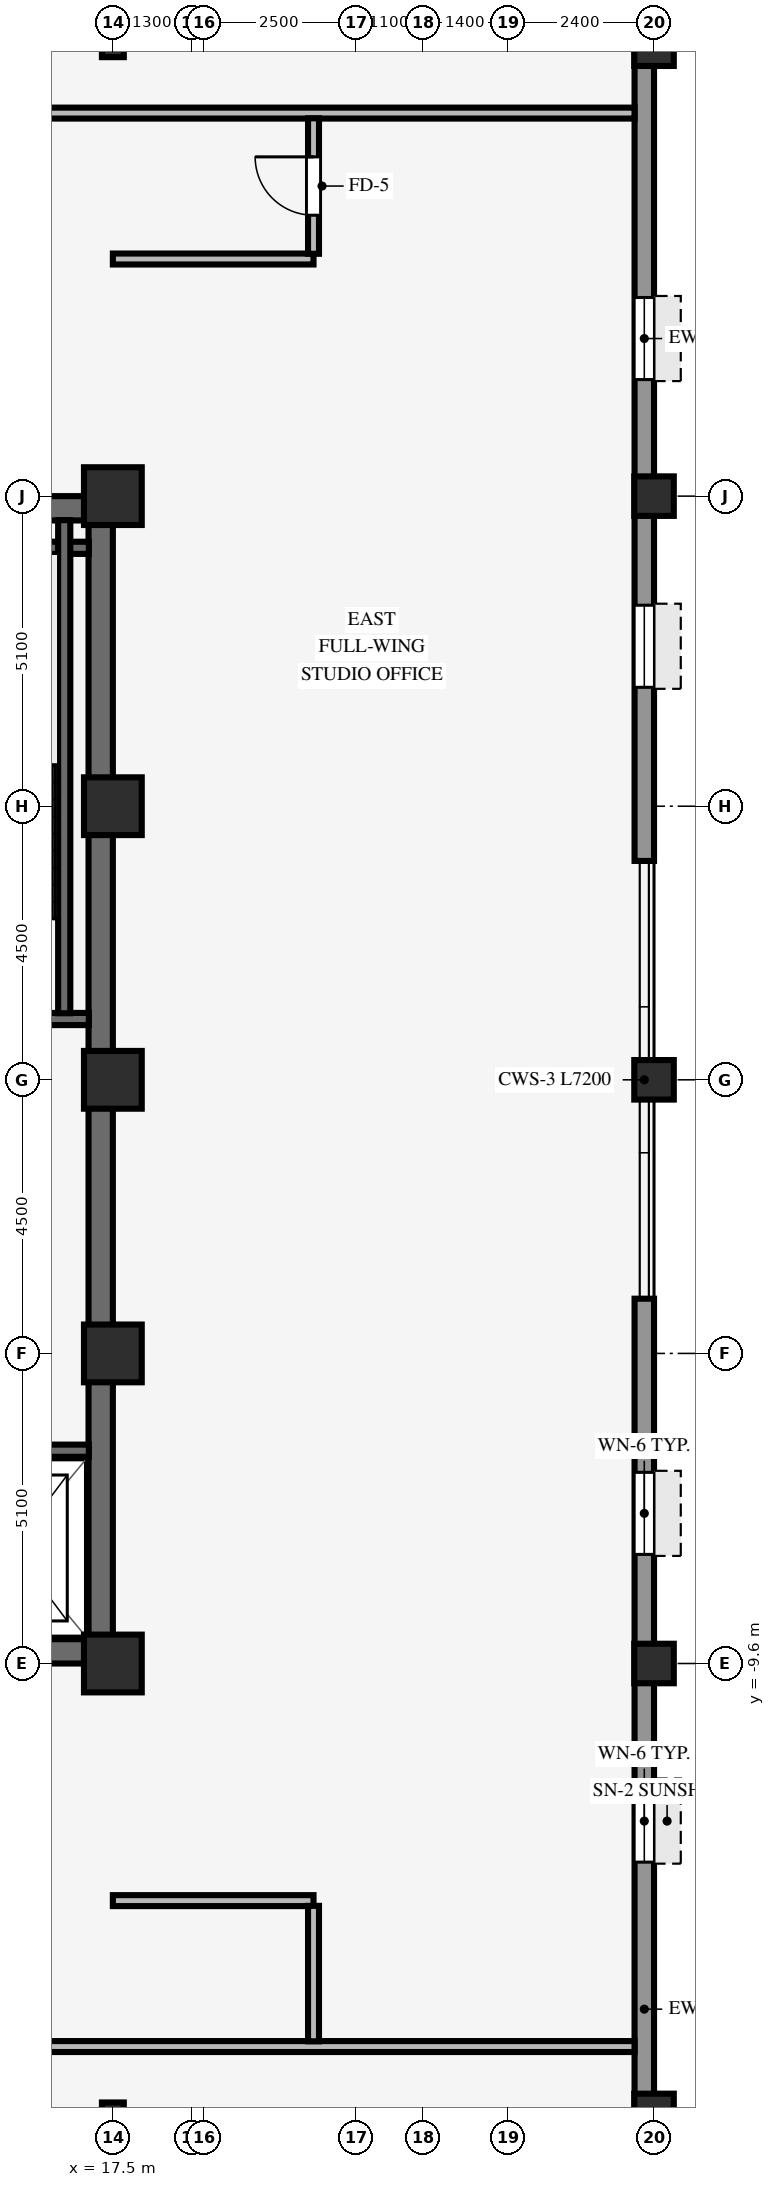
"""IFC4 building model, lengths in metres.
Left out: names, types, materials, properties, quantities, classifications, styles, units other than length and angle.
Written with IfcOpenShell. Run it as: python <this file> out.ifc"""

import sys

from ifc_helpers import new_model, si_unit, direction, frame, frame_2d, origin, origin_2d, place, context, subcontext, project, spatial, rectangle, hollow_rectangle, i_section, extrude, source, transform, mapped, element, fill, save


model = new_model("IFC4")
c1 = context("Model", 3, precision=1e-05, world=origin(), true_north=direction((0.0, 1.0)))
c2 = subcontext(c1, "Body", "Model", "MODEL_VIEW")
j1 = project(units=[si_unit("LENGTHUNIT", "METRE"), si_unit("PLANEANGLEUNIT", "RADIAN")], contexts=[c1])
p1 = place(None, origin())
s1 = spatial("IfcSite", under=j1, at=p1, CompositionType="ELEMENT")
p2 = place(p1, origin())
s2 = spatial("IfcBuilding", under=s1, at=p2, CompositionType="ELEMENT")
p3 = place(p2, frame((0.0, 0.0, 123.85)))
s3 = spatial("IfcBuildingStorey", under=s2, at=p3, CompositionType="ELEMENT", Elevation=123.85)
for number, where, z_axis, x_axis in (
    (1, (9.0, -9.4, 0.0), (0.0, 0.0, 1.0), (1.0, 0.0, 0.0)),
    (2, (9.0, 9.4, 0.0), (0.0, 0.0, 1.0), (1.0, 0.0, 0.0)),
):
    element("IfcWall", number, at=place(p3, frame(where, z_axis=z_axis, x_axis=x_axis)), inside=s3, PredefinedType="SHEAR", context=c2, shape_type="SweptSolid", body=[
        extrude(rectangle(XDim=8.5, YDim=0.4, at=frame_2d((4.25, 0.0))), origin(), (0.0, 0.0, 1.0), 3.37),
    ])
p4 = place(p3, frame((17.3, -9.205, 0.0), z_axis=(0.0, 0.0, 1.0), x_axis=(0.0, 1.0, 0.0)))
e3 = element("IfcWall", 3, at=p4, inside=s3, PredefinedType="SHEAR", context=c2, shape_type="SweptSolid", body=[
    extrude(rectangle(XDim=18.41, YDim=0.4, at=frame_2d((9.205, 0.0))), origin(), (0.0, 0.0, 1.0), 3.37),
])
for number, where, z_axis, x_axis in (
    (4, (17.5, -9.6, 0.0), (0.0, 0.0, 1.0), (1.0, 0.0, 0.0)),
    (5, (17.5, -4.5, 0.0), (0.0, 0.0, 1.0), (1.0, 0.0, 0.0)),
    (6, (17.5, 4.5, 0.0), (0.0, 0.0, 1.0), (1.0, 0.0, 0.0)),
    (7, (17.5, 9.6, 0.0), (0.0, 0.0, 1.0), (1.0, 0.0, 0.0)),
    (8, (17.5, 0.0, 0.0), (0.0, 0.0, 1.0), (1.0, 0.0, 0.0)),
):
    element("IfcColumn", number, at=place(p3, frame(where, z_axis=z_axis, x_axis=x_axis)), inside=s3, PredefinedType="COLUMN", context=c2, shape_type="SweptSolid", body=[
        extrude(rectangle(XDim=0.95, YDim=0.95, at=origin_2d()), origin(), (0.0, 0.0, 1.0), 3.37),
    ])
for number, where, z_axis, x_axis in (
    (9, (26.4, -17.0, 0.0), (0.0, 0.0, 1.0), (1.0, 0.0, 0.0)),
    (10, (26.4, -9.6, 0.0), (0.0, 0.0, 1.0), (1.0, 0.0, 0.0)),
    (11, (26.4, 0.0, 0.0), (0.0, 0.0, 1.0), (1.0, 0.0, 0.0)),
    (12, (26.4, 9.6, 0.0), (0.0, 0.0, 1.0), (1.0, 0.0, 0.0)),
    (13, (26.4, 17.0, 0.0), (0.0, 0.0, 1.0), (1.0, 0.0, 0.0)),
):
    element("IfcColumn", number, at=place(p3, frame(where, z_axis=z_axis, x_axis=x_axis)), inside=s3, PredefinedType="COLUMN", context=c2, shape_type="SweptSolid", body=[
        extrude(hollow_rectangle(XDim=0.65, YDim=0.65, WallThickness=0.04, InnerFilletRadius=0.04, OuterFilletRadius=0.08, at=origin_2d()), origin(), (0.0, 0.0, 1.0), 3.37),
    ])
for number, where, z_axis, x_axis in (
    (14, (17.5, -17.0, 0.0), (0.0, 0.0, 1.0), (1.0, 0.0, 0.0)),
    (15, (17.5, 17.0, 0.0), (0.0, 0.0, 1.0), (1.0, 0.0, 0.0)),
):
    element("IfcColumn", number, at=place(p3, frame(where, z_axis=z_axis, x_axis=x_axis)), inside=s3, PredefinedType="COLUMN", context=c2, shape_type="SweptSolid", body=[
        extrude(i_section(OverallWidth=0.36, OverallDepth=0.36, WebThickness=0.021, FlangeThickness=0.021, FilletRadius=0.018, at=origin_2d()), origin(), (0.0, 0.0, 1.0), 3.37),
    ])
p5 = place(p3, frame((26.24, -20.784, 0.0), z_axis=(0.0, 0.0, 1.0), x_axis=(0.0, 1.0, 0.0)))
e16 = element("IfcWall", 16, at=p5, inside=s3, PredefinedType="STANDARD", context=c2, shape_type="SweptSolid", body=[
    extrude(rectangle(XDim=17.184, YDim=0.32, at=frame_2d((8.592, 0.0))), origin(), (0.0, 0.0, 1.0), 2.705),
])
p6 = place(p5, frame((1.506, 0.0, 0.8)))
e17 = element("IfcOpeningElement", 17, at=p6, cuts=e16, PredefinedType="OPENING", context=c2, shape_type="SweptSolid", body=[
    extrude(rectangle(XDim=1.35, YDim=1.56, at=frame_2d((0.675, 0.78))), frame((0.0, 0.17, 0.0), z_axis=(0.0, -1.0, 0.0), x_axis=(1.0, 0.0, 0.0)), (0.0, 0.0, 1.0), 0.34),
])
p7 = place(p5, frame((7.917, 0.0, 0.8)))
e18 = element("IfcOpeningElement", 18, at=p7, cuts=e16, PredefinedType="OPENING", context=c2, shape_type="SweptSolid", body=[
    extrude(rectangle(XDim=1.35, YDim=1.56, at=frame_2d((0.675, 0.78))), frame((0.0, 0.17, 0.0), z_axis=(0.0, -1.0, 0.0), x_axis=(1.0, 0.0, 0.0)), (0.0, 0.0, 1.0), 0.34),
])
p8 = place(p5, frame((12.978, 0.0, 0.8)))
e19 = element("IfcOpeningElement", 19, at=p8, cuts=e16, PredefinedType="OPENING", context=c2, shape_type="SweptSolid", body=[
    extrude(rectangle(XDim=1.35, YDim=1.56, at=frame_2d((0.675, 0.78))), frame((0.0, 0.17, 0.0), z_axis=(0.0, -1.0, 0.0), x_axis=(1.0, 0.0, 0.0)), (0.0, 0.0, 1.0), 0.34),
])
p9 = place(p3, frame((26.24, 3.6, 0.0), z_axis=(0.0, 0.0, 1.0), x_axis=(0.0, 1.0, 0.0)))
e20 = element("IfcWall", 20, at=p9, inside=s3, PredefinedType="STANDARD", context=c2, shape_type="SweptSolid", body=[
    extrude(rectangle(XDim=17.184, YDim=0.32, at=frame_2d((8.592, 0.0))), origin(), (0.0, 0.0, 1.0), 2.705),
])
p10 = place(p9, frame((2.856, 0.0, 0.8)))
e21 = element("IfcOpeningElement", 21, at=p10, cuts=e20, PredefinedType="OPENING", context=c2, shape_type="SweptSolid", body=[
    extrude(rectangle(XDim=1.35, YDim=1.56, at=frame_2d((0.675, 0.78))), frame((0.0, 0.17, 0.0), z_axis=(0.0, -1.0, 0.0), x_axis=(1.0, 0.0, 0.0)), (0.0, 0.0, 1.0), 0.34),
])
p11 = place(p9, frame((7.917, 0.0, 0.8)))
e22 = element("IfcOpeningElement", 22, at=p11, cuts=e20, PredefinedType="OPENING", context=c2, shape_type="SweptSolid", body=[
    extrude(rectangle(XDim=1.35, YDim=1.56, at=frame_2d((0.675, 0.78))), frame((0.0, 0.17, 0.0), z_axis=(0.0, -1.0, 0.0), x_axis=(1.0, 0.0, 0.0)), (0.0, 0.0, 1.0), 0.34),
])
p12 = place(p9, frame((14.328, 0.0, 0.8)))
e23 = element("IfcOpeningElement", 23, at=p12, cuts=e20, PredefinedType="OPENING", context=c2, shape_type="SweptSolid", body=[
    extrude(rectangle(XDim=1.35, YDim=1.56, at=frame_2d((0.675, 0.78))), frame((0.0, 0.17, 0.0), z_axis=(0.0, -1.0, 0.0), x_axis=(1.0, 0.0, 0.0)), (0.0, 0.0, 1.0), 0.34),
])
for number, where, z_axis, x_axis in (
    (24, (13.535, 1.0, 0.0), (0.0, 0.0, 1.0), (1.0, 0.0, 0.0)),
    (25, (13.535, 8.75, 0.0), (0.0, 0.0, 1.0), (1.0, 0.0, 0.0)),
):
    element("IfcWall", number, at=place(p3, frame(where, z_axis=z_axis, x_axis=x_axis)), inside=s3, PredefinedType="SHEAR", context=c2, shape_type="SweptSolid", body=[
        extrude(rectangle(XDim=3.57, YDim=0.2, at=frame_2d((1.785, 0.0))), origin(), (0.0, 0.0, 1.0), 3.37),
    ])
p13 = place(p3, frame((16.7, 1.095, 0.0), z_axis=(0.0, 0.0, 1.0), x_axis=(0.0, 1.0, 0.0)))
e26 = element("IfcWall", 26, at=p13, inside=s3, PredefinedType="SHEAR", context=c2, shape_type="SweptSolid", body=[
    extrude(rectangle(XDim=8.11, YDim=0.2, at=frame_2d((4.055, 0.0))), origin(), (0.0, 0.0, 1.0), 3.37),
])
p14 = place(p3, frame((14.645, -6.1, 0.0), z_axis=(0.0, 0.0, 1.0), x_axis=(1.0, 0.0, 0.0)))
e27 = element("IfcWall", 27, at=p14, inside=s3, PredefinedType="SHEAR", context=c2, shape_type="SweptSolid", body=[
    extrude(rectangle(XDim=2.46, YDim=0.2, at=frame_2d((1.23, 0.0))), origin(), (0.0, 0.0, 1.0), 3.37),
])
p15 = place(p3, frame((-26.08, -15.9, 0.0), z_axis=(0.0, 0.0, 1.0), x_axis=(1.0, 0.0, 0.0)))
e28 = element("IfcWall", 28, at=p15, inside=s3, PredefinedType="PARTITIONING", context=c2, shape_type="SweptSolid", body=[
    extrude(rectangle(XDim=52.16, YDim=0.18, at=frame_2d((26.08, 0.0))), origin(), (0.0, 0.0, 1.0), 3.36),
])
p16 = place(p15, frame((18.11, 0.0, 0.0)))
e29 = element("IfcOpeningElement", 29, at=p16, cuts=e28, PredefinedType="OPENING", context=c2, shape_type="SweptSolid", body=[
    extrude(rectangle(XDim=0.96, YDim=2.1, at=frame_2d((0.48, 1.05))), frame((0.0, 0.1, 0.0), z_axis=(0.0, -1.0, 0.0), x_axis=(1.0, 0.0, 0.0)), (0.0, 0.0, 1.0), 0.2),
])
p17 = place(p15, frame((40.905, 0.0, 0.0)))
e30 = element("IfcOpeningElement", 30, at=p17, cuts=e28, PredefinedType="OPENING", context=c2, shape_type="SweptSolid", body=[
    extrude(rectangle(XDim=0.96, YDim=2.1, at=frame_2d((0.48, 1.05))), frame((0.0, 0.1, 0.0), z_axis=(0.0, -1.0, 0.0), x_axis=(1.0, 0.0, 0.0)), (0.0, 0.0, 1.0), 0.2),
])
p18 = place(p15, frame((28.575, 0.0, 0.0)))
e31 = element("IfcOpeningElement", 31, at=p18, cuts=e28, PredefinedType="OPENING", context=c2, shape_type="SweptSolid", body=[
    extrude(rectangle(XDim=0.96, YDim=2.1, at=frame_2d((0.48, 1.05))), frame((0.0, 0.1, 0.0), z_axis=(0.0, -1.0, 0.0), x_axis=(1.0, 0.0, 0.0)), (0.0, 0.0, 1.0), 0.2),
])
p19 = place(p15, frame((9.585, 0.0, 0.0)))
e32 = element("IfcOpeningElement", 32, at=p19, cuts=e28, PredefinedType="OPENING", context=c2, shape_type="SweptSolid", body=[
    extrude(rectangle(XDim=0.96, YDim=2.1, at=frame_2d((0.48, 1.05))), frame((0.0, 0.1, 0.0), z_axis=(0.0, -1.0, 0.0), x_axis=(1.0, 0.0, 0.0)), (0.0, 0.0, 1.0), 0.2),
])
for number, where, z_axis, x_axis in (
    (33, (17.5, -13.5, 0.0), (0.0, 0.0, 1.0), (1.0, 0.0, 0.0)),
    (34, (17.5, 13.5, 0.0), (0.0, 0.0, 1.0), (1.0, 0.0, 0.0)),
):
    element("IfcWall", number, at=place(p3, frame(where, z_axis=z_axis, x_axis=x_axis)), inside=s3, PredefinedType="PARTITIONING", context=c2, shape_type="SweptSolid", body=[
        extrude(rectangle(XDim=3.3, YDim=0.18, at=frame_2d((1.65, 0.0))), origin(), (0.0, 0.0, 1.0), 2.998),
    ])
p20 = place(p3, frame((-26.08, 15.9, 0.0), z_axis=(0.0, 0.0, 1.0), x_axis=(1.0, 0.0, 0.0)))
e35 = element("IfcWall", 35, at=p20, inside=s3, PredefinedType="PARTITIONING", context=c2, shape_type="SweptSolid", body=[
    extrude(rectangle(XDim=52.16, YDim=0.18, at=frame_2d((26.08, 0.0))), origin(), (0.0, 0.0, 1.0), 3.36),
])
p21 = place(p20, frame((23.3, 0.0, 0.0)))
e36 = element("IfcOpeningElement", 36, at=p21, cuts=e35, PredefinedType="OPENING", context=c2, shape_type="SweptSolid", body=[
    extrude(rectangle(XDim=0.96, YDim=2.1, at=frame_2d((0.48, 1.05))), frame((0.0, 0.1, 0.0), z_axis=(0.0, -1.0, 0.0), x_axis=(1.0, 0.0, 0.0)), (0.0, 0.0, 1.0), 0.2),
])
p22 = place(p20, frame((11.15, 0.0, 0.0)))
e37 = element("IfcOpeningElement", 37, at=p22, cuts=e35, PredefinedType="OPENING", context=c2, shape_type="SweptSolid", body=[
    extrude(rectangle(XDim=0.96, YDim=2.1, at=frame_2d((0.48, 1.05))), frame((0.0, 0.1, 0.0), z_axis=(0.0, -1.0, 0.0), x_axis=(1.0, 0.0, 0.0)), (0.0, 0.0, 1.0), 0.2),
])
p23 = place(p3, frame((20.8, -15.814, 0.0), z_axis=(0.0, 0.0, 1.0), x_axis=(0.0, 1.0, 0.0)))
e38 = element("IfcWall", 38, at=p23, inside=s3, PredefinedType="PARTITIONING", context=c2, shape_type="SweptSolid", body=[
    extrude(rectangle(XDim=2.228, YDim=0.18, at=frame_2d((1.114, 0.0))), origin(), (0.0, 0.0, 1.0), 3.36),
])
p24 = place(p3, frame((20.8, 13.586, 0.0), z_axis=(0.0, 0.0, 1.0), x_axis=(0.0, 1.0, 0.0)))
e39 = element("IfcWall", 39, at=p24, inside=s3, PredefinedType="PARTITIONING", context=c2, shape_type="SweptSolid", body=[
    extrude(rectangle(XDim=2.228, YDim=0.18, at=frame_2d((1.114, 0.0))), origin(), (0.0, 0.0, 1.0), 3.36),
])
p25 = place(p24, frame((0.634, 0.0, 0.0)))
e40 = element("IfcOpeningElement", 40, at=p25, cuts=e39, PredefinedType="OPENING", context=c2, shape_type="SweptSolid", body=[
    extrude(rectangle(XDim=0.96, YDim=2.1, at=frame_2d((0.48, 1.05))), frame((0.0, 0.1, 0.0), z_axis=(0.0, -1.0, 0.0), x_axis=(1.0, 0.0, 0.0)), (0.0, 0.0, 1.0), 0.2),
])
m1 = source(origin(), c2, "Body", "SweptSolid", [
    extrude(rectangle(XDim=1.35, YDim=1.56, at=frame_2d((0.675, 0.78))), frame((0.0, 0.03, 0.0), z_axis=(0.0, -1.0, 0.0), x_axis=(1.0, 0.0, 0.0)), (0.0, 0.0, 1.0), 0.06),
])
p26 = place(p7, origin())
e41 = element("IfcWindow", 41, at=p26, inside=s3, PartitioningType="SINGLE_PANEL", PredefinedType="WINDOW", context=c2, shape_type="MappedRepresentation", body=[
    mapped(m1, transform((0.0, 0.0, 0.0), scale=1.0)),
])
fill(e18, e41)
p27 = place(p8, origin())
e42 = element("IfcWindow", 42, at=p27, inside=s3, PartitioningType="SINGLE_PANEL", PredefinedType="WINDOW", context=c2, shape_type="MappedRepresentation", body=[
    mapped(m1, transform((0.0, 0.0, 0.0), scale=1.0)),
])
fill(e19, e42)
p28 = place(p10, origin())
e43 = element("IfcWindow", 43, at=p28, inside=s3, PartitioningType="SINGLE_PANEL", PredefinedType="WINDOW", context=c2, shape_type="MappedRepresentation", body=[
    mapped(m1, transform((0.0, 0.0, 0.0), scale=1.0)),
])
fill(e21, e43)
p29 = place(p11, origin())
e44 = element("IfcWindow", 44, at=p29, inside=s3, PartitioningType="SINGLE_PANEL", PredefinedType="WINDOW", context=c2, shape_type="MappedRepresentation", body=[
    mapped(m1, transform((0.0, 0.0, 0.0), scale=1.0)),
])
fill(e22, e44)
m2 = source(origin(), c2, "Body", "SweptSolid", [
    extrude(rectangle(XDim=0.96, YDim=2.1, at=frame_2d((0.48, 1.05))), frame((0.0, 0.025, 0.0), z_axis=(0.0, -1.0, 0.0), x_axis=(1.0, 0.0, 0.0)), (0.0, 0.0, 1.0), 0.05),
])
p30 = place(p25, origin())
e45 = element("IfcDoor", 45, at=p30, inside=s3, OperationType="SINGLE_SWING_RIGHT", PredefinedType="DOOR", context=c2, shape_type="MappedRepresentation", body=[
    mapped(m2, transform((0.0, 0.0, 0.0), scale=1.0)),
])
fill(e40, e45)
save(model, sys.argv[1])
